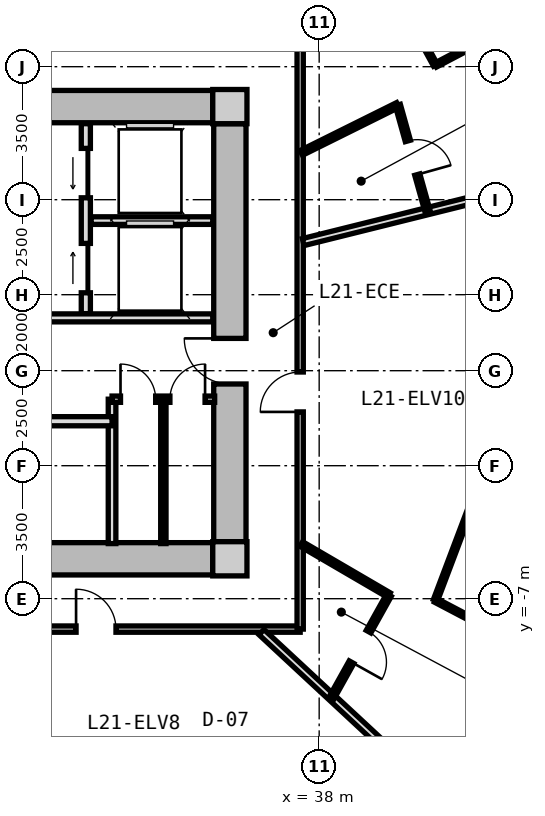
"""IFC4 building model, lengths in metres.
Left out: names, types, materials, properties, quantities, classifications, styles, units other than length and angle.
Written with IfcOpenShell. Run it as: python <this file> out.ifc"""

import sys

from ifc_helpers import new_model, si_unit, direction, frame, frame_2d, origin, origin_2d, place, context, subcontext, project, spatial, rectangle, extrude, source, transform, mapped, element, fill, save


model = new_model("IFC4")
c1 = context("Model", 3, precision=1e-05, world=origin(), true_north=direction((0.0, 1.0)))
c2 = subcontext(c1, "Body", "Model", "MODEL_VIEW")
j1 = project(units=[si_unit("LENGTHUNIT", "METRE"), si_unit("PLANEANGLEUNIT", "RADIAN")], contexts=[c1])
p1 = place(None, origin())
s1 = spatial("IfcSite", under=j1, at=p1, CompositionType="ELEMENT")
p2 = place(p1, origin())
s2 = spatial("IfcBuilding", under=s1, at=p2, CompositionType="ELEMENT")
p3 = place(p2, frame((0.0, 0.0, 70.4)))
s3 = spatial("IfcBuildingStorey", under=s2, at=p3, CompositionType="ELEMENT", Elevation=70.4)
m1 = source(origin(), c2, "Body", "SweptSolid", [
    extrude(rectangle(XDim=0.9, YDim=0.9, at=origin_2d()), origin(), (0.0, 0.0, 1.0), 3.05),
])
for number, where, z_axis, x_axis in (
    (1, (35.65, -5.95, 0.0), (0.0, 0.0, 1.0), (1.0, 0.0, 0.0)),
    (2, (35.65, 5.95, 0.0), (0.0, 0.0, 1.0), (1.0, 0.0, 0.0)),
):
    element("IfcColumn", number, at=place(p3, frame(where, z_axis=z_axis, x_axis=x_axis)), inside=s3, PredefinedType="COLUMN", context=c2, shape_type="MappedRepresentation", body=[
        mapped(m1, transform((0.0, 0.0, 0.0), x_axis=(1.0, 0.0, 0.0), y_axis=(0.0, 1.0, 0.0), z_axis=(0.0, 0.0, 1.0), scale=1.0)),
    ])
m2 = source(origin(), c2, "Body", "SweptSolid", [
    extrude(rectangle(XDim=14.4, YDim=0.85, at=frame_2d((7.2, 0.0))), origin(), (0.0, 0.0, 1.0), 2.73),
])
for number, where, z_axis, x_axis in (
    (3, (20.8, 5.95, 0.0), (0.0, 0.0, 1.0), (1.0, 0.0, 0.0)),
    (4, (35.2, -5.95, 0.0), (0.0, 0.0, 1.0), (-1.0, 0.0, 0.0)),
):
    element("IfcWall", number, at=place(p3, frame(where, z_axis=z_axis, x_axis=x_axis)), inside=s3, PredefinedType="SHEAR", context=c2, shape_type="MappedRepresentation", body=[
        mapped(m2, transform((0.0, 0.0, 0.0), x_axis=(1.0, 0.0, 0.0), y_axis=(0.0, 1.0, 0.0), z_axis=(0.0, 0.0, 1.0), scale=1.0)),
    ])
m3 = source(origin(), c2, "Body", "SweptSolid", [
    extrude(rectangle(XDim=11.0, YDim=0.85, at=frame_2d((5.5, 0.0))), origin(), (0.0, 0.0, 1.0), 2.73),
])
p4 = place(p3, frame((35.65, 5.5, 0.0), z_axis=(0.0, 0.0, 1.0), x_axis=(0.0, -1.0, 0.0)))
e5 = element("IfcWall", 5, at=p4, inside=s3, PredefinedType="SHEAR", context=c2, shape_type="MappedRepresentation", body=[
    mapped(m3, transform((0.0, 0.0, 0.0), x_axis=(1.0, 0.0, 0.0), y_axis=(0.0, 1.0, 0.0), z_axis=(0.0, 0.0, 1.0), scale=1.0)),
])
p5 = place(p4, frame((5.65, 0.0, 0.0)))
e6 = element("IfcOpeningElement", 6, at=p5, cuts=e5, PredefinedType="OPENING", context=c2, shape_type="SweptSolid", body=[
    extrude(rectangle(XDim=1.2, YDim=2.15, at=frame_2d((0.6, 1.075))), frame((0.0, 0.435, 0.0), z_axis=(0.0, -1.0, 0.0), x_axis=(1.0, 0.0, 0.0)), (0.0, 0.0, 1.0), 0.87),
])
m4 = source(origin(), c2, "Body", "SweptSolid", [
    extrude(rectangle(XDim=5.0, YDim=0.24, at=frame_2d((2.5, 0.0))), origin(), (0.0, 0.0, 1.0), 2.715),
])
p6 = place(p3, frame((31.86, 0.5, 0.0), z_axis=(0.0, 0.0, 1.0), x_axis=(0.0, 1.0, 0.0)))
e7 = element("IfcWall", 7, at=p6, inside=s3, PredefinedType="PARTITIONING", context=c2, shape_type="MappedRepresentation", body=[
    mapped(m4, transform((0.0, 0.0, 0.0), x_axis=(1.0, 0.0, 0.0), y_axis=(0.0, 1.0, 0.0), z_axis=(0.0, 0.0, 1.0), scale=1.0)),
])
p7 = place(p6, frame((3.05, 0.0, 0.0)))
e8 = element("IfcOpeningElement", 8, at=p7, cuts=e7, PredefinedType="OPENING", context=c2, shape_type="SweptSolid", body=[
    extrude(rectangle(XDim=1.3, YDim=2.2, at=frame_2d((0.65, 1.1))), frame((0.0, 0.13, 0.0), z_axis=(0.0, -1.0, 0.0), x_axis=(1.0, 0.0, 0.0)), (0.0, 0.0, 1.0), 0.26),
])
p8 = place(p6, frame((0.55, 0.0, 0.0)))
e9 = element("IfcOpeningElement", 9, at=p8, cuts=e7, PredefinedType="OPENING", context=c2, shape_type="SweptSolid", body=[
    extrude(rectangle(XDim=1.3, YDim=2.2, at=frame_2d((0.65, 1.1))), frame((0.0, 0.13, 0.0), z_axis=(0.0, -1.0, 0.0), x_axis=(1.0, 0.0, 0.0)), (0.0, 0.0, 1.0), 0.26),
])
m5 = source(origin(), c2, "Body", "SweptSolid", [
    extrude(rectangle(XDim=3.2, YDim=0.2, at=frame_2d((1.6, 0.0))), origin(), (0.0, 0.0, 1.0), 2.715),
])
p9 = place(p3, frame((32.0, 2.95, 0.0), z_axis=(0.0, 0.0, 1.0), x_axis=(1.0, 0.0, 0.0)))
e10 = element("IfcWall", 10, at=p9, inside=s3, PredefinedType="PARTITIONING", context=c2, shape_type="MappedRepresentation", body=[
    mapped(m5, transform((0.0, 0.0, 0.0), x_axis=(1.0, 0.0, 0.0), y_axis=(0.0, 1.0, 0.0), z_axis=(0.0, 0.0, 1.0), scale=1.0)),
])
m6 = source(origin(), c2, "Body", "SweptSolid", [
    extrude(rectangle(XDim=6.66, YDim=0.21, at=frame_2d((3.33, 0.0))), origin(), (0.0, 0.0, 1.0), 2.715),
])
p10 = place(p3, frame((28.54, 0.39, 0.0), z_axis=(0.0, 0.0, 1.0), x_axis=(1.0, 0.0, 0.0)))
e11 = element("IfcWall", 11, at=p10, inside=s3, PredefinedType="PARTITIONING", context=c2, shape_type="MappedRepresentation", body=[
    mapped(m6, transform((0.0, 0.0, 0.0), x_axis=(1.0, 0.0, 0.0), y_axis=(0.0, 1.0, 0.0), z_axis=(0.0, 0.0, 1.0), scale=1.0)),
])
p11 = place(p10, frame((1.0, 0.0, 0.0)))
e12 = element("IfcOpeningElement", 12, at=p11, cuts=e11, PredefinedType="OPENING", context=c2, shape_type="SweptSolid", body=[
    extrude(rectangle(XDim=1.2, YDim=2.15, at=frame_2d((0.6, 1.075))), frame((0.0, 0.115, 0.0), z_axis=(0.0, -1.0, 0.0), x_axis=(1.0, 0.0, 0.0)), (0.0, 0.0, 1.0), 0.23),
])
m7 = source(origin(), c2, "Body", "SweptSolid", [
    extrude(rectangle(XDim=3.8, YDim=0.2, at=frame_2d((1.9, 0.0))), origin(), (0.0, 0.0, 1.0), 2.715),
])
p12 = place(p3, frame((32.55, -5.55, 0.0), z_axis=(0.0, 0.0, 1.0), x_axis=(0.0, 1.0, 0.0)))
e13 = element("IfcWall", 13, at=p12, inside=s3, PredefinedType="PARTITIONING", context=c2, shape_type="MappedRepresentation", body=[
    mapped(m7, transform((0.0, 0.0, 0.0), x_axis=(1.0, 0.0, 0.0), y_axis=(0.0, 1.0, 0.0), z_axis=(0.0, 0.0, 1.0), scale=1.0)),
])
m8 = source(origin(), c2, "Body", "SweptSolid", [
    extrude(rectangle(XDim=4.13, YDim=0.24, at=frame_2d((2.065, 0.0))), origin(), (0.0, 0.0, 1.0), 2.715),
])
p13 = place(p3, frame((28.42, -2.33, 0.0), z_axis=(0.0, 0.0, 1.0), x_axis=(1.0, 0.0, 0.0)))
e14 = element("IfcWall", 14, at=p13, inside=s3, PredefinedType="PARTITIONING", context=c2, shape_type="MappedRepresentation", body=[
    mapped(m8, transform((0.0, 0.0, 0.0), x_axis=(1.0, 0.0, 0.0), y_axis=(0.0, 1.0, 0.0), z_axis=(0.0, 0.0, 1.0), scale=1.0)),
])
m9 = source(origin(), c2, "Body", "SweptSolid", [
    extrude(rectangle(XDim=2.7, YDim=0.165, at=frame_2d((1.35, 0.0))), origin(), (0.0, 0.0, 1.0), 2.715),
])
p14 = place(p3, frame((32.55, -1.75, 0.0), z_axis=(0.0, 0.0, 1.0), x_axis=(1.0, 0.0, 0.0)))
e15 = element("IfcWall", 15, at=p14, inside=s3, PredefinedType="PARTITIONING", context=c2, shape_type="MappedRepresentation", body=[
    mapped(m9, transform((0.0, 0.0, 0.0), x_axis=(1.0, 0.0, 0.0), y_axis=(0.0, 1.0, 0.0), z_axis=(0.0, 0.0, 1.0), scale=1.0)),
])
p15 = place(p14, frame((0.222, 0.0, 0.0)))
e16 = element("IfcOpeningElement", 16, at=p15, cuts=e15, PredefinedType="OPENING", context=c2, shape_type="SweptSolid", body=[
    extrude(rectangle(XDim=0.925, YDim=2.1, at=frame_2d((0.462, 1.05))), frame((0.0, 0.093, 0.0), z_axis=(0.0, -1.0, 0.0), x_axis=(1.0, 0.0, 0.0)), (0.0, 0.0, 1.0), 0.185),
])
p16 = place(p14, frame((1.522, 0.0, 0.0)))
e17 = element("IfcOpeningElement", 17, at=p16, cuts=e15, PredefinedType="OPENING", context=c2, shape_type="SweptSolid", body=[
    extrude(rectangle(XDim=0.925, YDim=2.1, at=frame_2d((0.462, 1.05))), frame((0.0, 0.093, 0.0), z_axis=(0.0, -1.0, 0.0), x_axis=(1.0, 0.0, 0.0)), (0.0, 0.0, 1.0), 0.185),
])
m10 = source(origin(), c2, "Body", "SweptSolid", [
    extrude(rectangle(XDim=3.8, YDim=0.14, at=frame_2d((1.9, 0.0))), origin(), (0.0, 0.0, 1.0), 2.715),
])
p17 = place(p3, frame((33.9, -5.55, 0.0), z_axis=(0.0, 0.0, 1.0), x_axis=(0.0, 1.0, 0.0)))
e18 = element("IfcWall", 18, at=p17, inside=s3, PredefinedType="PARTITIONING", context=c2, shape_type="MappedRepresentation", body=[
    mapped(m10, transform((0.0, 0.0, 0.0), x_axis=(1.0, 0.0, 0.0), y_axis=(0.0, 1.0, 0.0), z_axis=(0.0, 0.0, 1.0), scale=1.0)),
])
m11 = source(origin(), c2, "Body", "SweptSolid", [
    extrude(rectangle(XDim=19.0, YDim=0.165, at=frame_2d((9.5, 0.0))), origin(), (0.0, 0.0, 1.0), 2.715),
])
p18 = place(p3, frame((37.5, -7.8, 0.0), z_axis=(0.0, 0.0, 1.0), x_axis=(-1.0, 0.0, 0.0)))
e19 = element("IfcWall", 19, at=p18, inside=s3, PredefinedType="PARTITIONING", context=c2, shape_type="MappedRepresentation", body=[
    mapped(m11, transform((0.0, 0.0, 0.0), x_axis=(1.0, 0.0, 0.0), y_axis=(0.0, 1.0, 0.0), z_axis=(0.0, 0.0, 1.0), scale=1.0)),
])
p19 = place(p18, frame((14.72, 0.0, 0.0)))
e20 = element("IfcOpeningElement", 20, at=p19, cuts=e19, PredefinedType="OPENING", context=c2, shape_type="SweptSolid", body=[
    extrude(rectangle(XDim=1.05, YDim=2.15, at=frame_2d((0.525, 1.075))), frame((0.0, 0.093, 0.0), z_axis=(0.0, -1.0, 0.0), x_axis=(1.0, 0.0, 0.0)), (0.0, 0.0, 1.0), 0.185),
])
p20 = place(p18, frame((4.847, 0.0, 0.0)))
e21 = element("IfcOpeningElement", 21, at=p20, cuts=e19, PredefinedType="OPENING", context=c2, shape_type="SweptSolid", body=[
    extrude(rectangle(XDim=1.05, YDim=2.15, at=frame_2d((0.525, 1.075))), frame((0.0, 0.093, 0.0), z_axis=(0.0, -1.0, 0.0), x_axis=(1.0, 0.0, 0.0)), (0.0, 0.0, 1.0), 0.185),
])
m12 = source(origin(), c2, "Body", "SweptSolid", [
    extrude(rectangle(XDim=15.6, YDim=0.165, at=frame_2d((7.8, 0.0))), origin(), (0.0, 0.0, 1.0), 2.715),
])
p21 = place(p3, frame((37.5, 7.8, 0.0), z_axis=(0.0, 0.0, 1.0), x_axis=(0.0, -1.0, 0.0)))
e22 = element("IfcWall", 22, at=p21, inside=s3, PredefinedType="PARTITIONING", context=c2, shape_type="MappedRepresentation", body=[
    mapped(m12, transform((0.0, 0.0, 0.0), x_axis=(1.0, 0.0, 0.0), y_axis=(0.0, 1.0, 0.0), z_axis=(0.0, 0.0, 1.0), scale=1.0)),
])
p22 = place(p21, frame((8.835, 0.0, 0.0)))
e23 = element("IfcOpeningElement", 23, at=p22, cuts=e22, PredefinedType="OPENING", context=c2, shape_type="SweptSolid", body=[
    extrude(rectangle(XDim=1.05, YDim=2.15, at=frame_2d((0.525, 1.075))), frame((0.0, 0.093, 0.0), z_axis=(0.0, -1.0, 0.0), x_axis=(1.0, 0.0, 0.0)), (0.0, 0.0, 1.0), 0.185),
])
m13 = source(origin(), c2, "Body", "SweptSolid", [
    extrude(rectangle(XDim=7.435, YDim=0.19, at=frame_2d((3.717, 0.0))), origin(), (0.0, 0.0, 1.0), 2.165),
])
p23 = place(p3, frame((36.483, -7.88, 0.0), z_axis=(0.0, 0.0, 1.0), x_axis=(0.732651956848, -0.680603489652, 0.0)))
e24 = element("IfcWall", 24, at=p23, inside=s3, PredefinedType="PARTITIONING", context=c2, shape_type="MappedRepresentation", body=[
    mapped(m13, transform((0.0, 0.0, 0.0), x_axis=(1.0, 0.0, 0.0), y_axis=(0.0, 1.0, 0.0), z_axis=(0.0, 0.0, 1.0), scale=1.0)),
])
m14 = source(origin(), c2, "Body", "SweptSolid", [
    extrude(rectangle(XDim=9.737, YDim=0.19, at=frame_2d((4.869, 0.0))), origin(), (0.0, 0.0, 1.0), 2.165),
])
p24 = place(p3, frame((37.58, 2.385, 0.0), z_axis=(0.0, 0.0, 1.0), x_axis=(0.970392716238, 0.241532557375, 0.0)))
e25 = element("IfcWall", 25, at=p24, inside=s3, PredefinedType="PARTITIONING", context=c2, shape_type="MappedRepresentation", body=[
    mapped(m14, transform((0.0, 0.0, 0.0), x_axis=(1.0, 0.0, 0.0), y_axis=(0.0, 1.0, 0.0), z_axis=(0.0, 0.0, 1.0), scale=1.0)),
])
m15 = source(origin(), c2, "Body", "SweptSolid", [
    extrude(rectangle(XDim=2.669, YDim=0.14, at=frame_2d((1.335, 0.0))), origin(), (0.0, 0.0, 1.0), 2.715),
])
p25 = place(p3, frame((37.53, -5.561, 0.0), z_axis=(0.0, 0.0, 1.0), x_axis=(0.86369928178, -0.50400749067, 0.0)))
e26 = element("IfcWall", 26, at=p25, inside=s3, PredefinedType="PARTITIONING", context=c2, shape_type="MappedRepresentation", body=[
    mapped(m15, transform((0.0, 0.0, 0.0), x_axis=(1.0, 0.0, 0.0), y_axis=(0.0, 1.0, 0.0), z_axis=(0.0, 0.0, 1.0), scale=1.0)),
])
m16 = source(origin(), c2, "Body", "SweptSolid", [
    extrude(rectangle(XDim=3.121, YDim=0.14, at=frame_2d((1.561, 0.0))), origin(), (0.0, 0.0, 1.0), 2.715),
])
p26 = place(p3, frame((39.836, -6.906, 0.0), z_axis=(0.0, 0.0, 1.0), x_axis=(-0.487302357327, -0.873233309342, 0.0)))
e27 = element("IfcWall", 27, at=p26, inside=s3, PredefinedType="PARTITIONING", context=c2, shape_type="MappedRepresentation", body=[
    mapped(m16, transform((0.0, 0.0, 0.0), x_axis=(1.0, 0.0, 0.0), y_axis=(0.0, 1.0, 0.0), z_axis=(0.0, 0.0, 1.0), scale=1.0)),
])
p27 = place(p26, frame((1.101, 0.0, 0.0)))
e28 = element("IfcOpeningElement", 28, at=p27, cuts=e27, PredefinedType="OPENING", context=c2, shape_type="SweptSolid", body=[
    extrude(rectangle(XDim=0.92, YDim=2.1, at=frame_2d((0.46, 1.05))), frame((0.0, 0.08, 0.0), z_axis=(0.0, -1.0, 0.0), x_axis=(1.0, 0.0, 0.0)), (0.0, 0.0, 1.0), 0.16),
])
m17 = source(origin(), c2, "Body", "SweptSolid", [
    extrude(rectangle(XDim=3.864, YDim=0.115, at=frame_2d((1.932, 0.0))), origin(), (0.0, 0.0, 1.0), 2.715),
])
p28 = place(p3, frame((41.06, -7.041, 0.0), z_axis=(0.0, 0.0, 1.0), x_axis=(0.885194959803, -0.465220252289, 0.0)))
e29 = element("IfcWall", 29, at=p28, inside=s3, PredefinedType="PARTITIONING", context=c2, shape_type="MappedRepresentation", body=[
    mapped(m17, transform((0.0, 0.0, 0.0), x_axis=(1.0, 0.0, 0.0), y_axis=(0.0, 1.0, 0.0), z_axis=(0.0, 0.0, 1.0), scale=1.0)),
])
p29 = place(p28, frame((1.457, 0.0, 0.0)))
e30 = element("IfcOpeningElement", 30, at=p29, cuts=e29, PredefinedType="OPENING", context=c2, shape_type="SweptSolid", body=[
    extrude(rectangle(XDim=0.95, YDim=2.1, at=frame_2d((0.475, 1.05))), frame((0.0, 0.067, 0.0), z_axis=(0.0, -1.0, 0.0), x_axis=(1.0, 0.0, 0.0)), (0.0, 0.0, 1.0), 0.135),
])
m18 = source(origin(), c2, "Body", "SweptSolid", [
    extrude(rectangle(XDim=3.685, YDim=0.115, at=frame_2d((1.843, 0.0))), origin(), (0.0, 0.0, 1.0), 2.715),
])
p30 = place(p3, frame((41.06, -7.041, 0.0), z_axis=(0.0, 0.0, 1.0), x_axis=(0.353503632997, 0.935433151785, 0.0)))
e31 = element("IfcWall", 31, at=p30, inside=s3, PredefinedType="PARTITIONING", context=c2, shape_type="MappedRepresentation", body=[
    mapped(m18, transform((0.0, 0.0, 0.0), x_axis=(1.0, 0.0, 0.0), y_axis=(0.0, 1.0, 0.0), z_axis=(0.0, 0.0, 1.0), scale=1.0)),
])
m19 = source(origin(), c2, "Body", "SweptSolid", [
    extrude(rectangle(XDim=2.834, YDim=0.14, at=frame_2d((1.417, 0.0))), origin(), (0.0, 0.0, 1.0), 2.715),
])
p31 = place(p3, frame((37.53, 4.732, 0.0), z_axis=(0.0, 0.0, 1.0), x_axis=(0.895681174462, 0.444696788513, 0.0)))
e32 = element("IfcWall", 32, at=p31, inside=s3, PredefinedType="PARTITIONING", context=c2, shape_type="MappedRepresentation", body=[
    mapped(m19, transform((0.0, 0.0, 0.0), x_axis=(1.0, 0.0, 0.0), y_axis=(0.0, 1.0, 0.0), z_axis=(0.0, 0.0, 1.0), scale=1.0)),
])
m20 = source(origin(), c2, "Body", "SweptSolid", [
    extrude(rectangle(XDim=2.885, YDim=0.14, at=frame_2d((1.442, 0.0))), origin(), (0.0, 0.0, 1.0), 2.715),
])
p32 = place(p3, frame((40.069, 5.992, 0.0), z_axis=(0.0, 0.0, 1.0), x_axis=(0.269799431837, -0.962916541856, 0.0)))
e33 = element("IfcWall", 33, at=p32, inside=s3, PredefinedType="PARTITIONING", context=c2, shape_type="MappedRepresentation", body=[
    mapped(m20, transform((0.0, 0.0, 0.0), x_axis=(1.0, 0.0, 0.0), y_axis=(0.0, 1.0, 0.0), z_axis=(0.0, 0.0, 1.0), scale=1.0)),
])
p33 = place(p32, frame((0.982, 0.0, 0.0)))
e34 = element("IfcOpeningElement", 34, at=p33, cuts=e33, PredefinedType="OPENING", context=c2, shape_type="SweptSolid", body=[
    extrude(rectangle(XDim=0.92, YDim=2.1, at=frame_2d((0.46, 1.05))), frame((0.0, 0.08, 0.0), z_axis=(0.0, -1.0, 0.0), x_axis=(1.0, 0.0, 0.0)), (0.0, 0.0, 1.0), 0.16),
])
p34 = place(p3, frame((41.06, 7.041, 0.0), z_axis=(0.0, 0.0, 1.0), x_axis=(0.885194959803, 0.465220252289, 0.0)))
e35 = element("IfcWall", 35, at=p34, inside=s3, PredefinedType="PARTITIONING", context=c2, shape_type="MappedRepresentation", body=[
    mapped(m17, transform((0.0, 0.0, 0.0), x_axis=(1.0, 0.0, 0.0), y_axis=(0.0, 1.0, 0.0), z_axis=(0.0, 0.0, 1.0), scale=1.0)),
])
m21 = source(origin(), c2, "Body", "SweptSolid", [
    extrude(rectangle(XDim=3.888, YDim=0.115, at=frame_2d((1.944, 0.0))), origin(), (0.0, 0.0, 1.0), 2.715),
])
p35 = place(p3, frame((41.06, 7.041, 0.0), z_axis=(0.0, 0.0, 1.0), x_axis=(-0.480382482853, 0.877059103007, 0.0)))
e36 = element("IfcWall", 36, at=p35, inside=s3, PredefinedType="PARTITIONING", context=c2, shape_type="MappedRepresentation", body=[
    mapped(m21, transform((0.0, 0.0, 0.0), x_axis=(1.0, 0.0, 0.0), y_axis=(0.0, 1.0, 0.0), z_axis=(0.0, 0.0, 1.0), scale=1.0)),
])
p36 = place(p35, frame((1.469, 0.0, 0.0)))
e37 = element("IfcOpeningElement", 37, at=p36, cuts=e36, PredefinedType="OPENING", context=c2, shape_type="SweptSolid", body=[
    extrude(rectangle(XDim=0.95, YDim=2.1, at=frame_2d((0.475, 1.05))), frame((0.0, 0.067, 0.0), z_axis=(0.0, -1.0, 0.0), x_axis=(1.0, 0.0, 0.0)), (0.0, 0.0, 1.0), 0.135),
])
m22 = source(origin(), c2, "Body", "SweptSolid", [
    extrude(rectangle(XDim=1.3, YDim=2.2, at=frame_2d((0.65, 1.1))), frame((0.0, 0.025, 0.0), z_axis=(0.0, -1.0, 0.0), x_axis=(1.0, 0.0, 0.0)), (0.0, 0.0, 1.0), 0.05),
])
p37 = place(p7, origin())
e38 = element("IfcDoor", 38, at=p37, inside=s3, OperationType="SLIDING_TO_LEFT", PredefinedType="DOOR", context=c2, shape_type="MappedRepresentation", body=[
    mapped(m22, transform((0.0, 0.0, 0.0), x_axis=(1.0, 0.0, 0.0), y_axis=(0.0, 1.0, 0.0), z_axis=(0.0, 0.0, 1.0), scale=1.0)),
])
fill(e8, e38)
p38 = place(p8, origin())
e39 = element("IfcDoor", 39, at=p38, inside=s3, OperationType="SLIDING_TO_RIGHT", PredefinedType="DOOR", context=c2, shape_type="MappedRepresentation", body=[
    mapped(m22, transform((0.0, 0.0, 0.0), x_axis=(1.0, 0.0, 0.0), y_axis=(0.0, 1.0, 0.0), z_axis=(0.0, 0.0, 1.0), scale=1.0)),
])
fill(e9, e39)
m23 = source(origin(), c2, "Body", "SweptSolid", [
    extrude(rectangle(XDim=1.2, YDim=2.15, at=frame_2d((0.6, 1.075))), frame((0.0, 0.025, 0.0), z_axis=(0.0, -1.0, 0.0), x_axis=(1.0, 0.0, 0.0)), (0.0, 0.0, 1.0), 0.05),
])
p39 = place(p5, frame((1.2, 0.0, 0.0), z_axis=(0.0, 0.0, 1.0), x_axis=(-1.0, 0.0, 0.0)))
e40 = element("IfcDoor", 40, at=p39, inside=s3, OperationType="SINGLE_SWING_RIGHT", PredefinedType="DOOR", context=c2, shape_type="MappedRepresentation", body=[
    mapped(m23, transform((0.0, 0.0, 0.0), x_axis=(1.0, 0.0, 0.0), y_axis=(0.0, 1.0, 0.0), z_axis=(0.0, 0.0, 1.0), scale=1.0)),
])
fill(e6, e40)
m24 = source(origin(), c2, "Body", "SweptSolid", [
    extrude(rectangle(XDim=0.925, YDim=2.1, at=frame_2d((0.462, 1.05))), frame((0.0, 0.025, 0.0), z_axis=(0.0, -1.0, 0.0), x_axis=(1.0, 0.0, 0.0)), (0.0, 0.0, 1.0), 0.05),
])
p40 = place(p15, origin())
e41 = element("IfcDoor", 41, at=p40, inside=s3, OperationType="SINGLE_SWING_LEFT", PredefinedType="DOOR", context=c2, shape_type="MappedRepresentation", body=[
    mapped(m24, transform((0.0, 0.0, 0.0), x_axis=(1.0, 0.0, 0.0), y_axis=(0.0, 1.0, 0.0), z_axis=(0.0, 0.0, 1.0), scale=1.0)),
])
fill(e16, e41)
p41 = place(p16, origin())
e42 = element("IfcDoor", 42, at=p41, inside=s3, OperationType="SINGLE_SWING_RIGHT", PredefinedType="DOOR", context=c2, shape_type="MappedRepresentation", body=[
    mapped(m24, transform((0.0, 0.0, 0.0), x_axis=(1.0, 0.0, 0.0), y_axis=(0.0, 1.0, 0.0), z_axis=(0.0, 0.0, 1.0), scale=1.0)),
])
fill(e17, e42)
m25 = source(origin(), c2, "Body", "SweptSolid", [
    extrude(rectangle(XDim=1.05, YDim=2.15, at=frame_2d((0.525, 1.075))), frame((0.0, 0.025, 0.0), z_axis=(0.0, -1.0, 0.0), x_axis=(1.0, 0.0, 0.0)), (0.0, 0.0, 1.0), 0.05),
])
p42 = place(p20, frame((1.05, 0.0, 0.0), z_axis=(0.0, 0.0, 1.0), x_axis=(-1.0, 0.0, 0.0)))
e43 = element("IfcDoor", 43, at=p42, inside=s3, OperationType="SINGLE_SWING_LEFT", PredefinedType="DOOR", context=c2, shape_type="MappedRepresentation", body=[
    mapped(m25, transform((0.0, 0.0, 0.0), x_axis=(1.0, 0.0, 0.0), y_axis=(0.0, 1.0, 0.0), z_axis=(0.0, 0.0, 1.0), scale=1.0)),
])
fill(e21, e43)
p43 = place(p22, frame((1.05, 0.0, 0.0), z_axis=(0.0, 0.0, 1.0), x_axis=(-1.0, 0.0, 0.0)))
e44 = element("IfcDoor", 44, at=p43, inside=s3, OperationType="SINGLE_SWING_LEFT", PredefinedType="DOOR", context=c2, shape_type="MappedRepresentation", body=[
    mapped(m25, transform((0.0, 0.0, 0.0), x_axis=(1.0, 0.0, 0.0), y_axis=(0.0, 1.0, 0.0), z_axis=(0.0, 0.0, 1.0), scale=1.0)),
])
fill(e23, e44)
m26 = source(origin(), c2, "Body", "SweptSolid", [
    extrude(rectangle(XDim=0.92, YDim=2.1, at=frame_2d((0.46, 1.05))), frame((0.0, 0.025, 0.0), z_axis=(0.0, -1.0, 0.0), x_axis=(1.0, 0.0, 0.0)), (0.0, 0.0, 1.0), 0.05),
])
p44 = place(p27, origin())
e45 = element("IfcDoor", 45, at=p44, inside=s3, OperationType="SINGLE_SWING_RIGHT", PredefinedType="DOOR", context=c2, shape_type="MappedRepresentation", body=[
    mapped(m26, transform((0.0, 0.0, 0.0), x_axis=(1.0, 0.0, 0.0), y_axis=(0.0, 1.0, 0.0), z_axis=(0.0, 0.0, 1.0), scale=1.0)),
])
fill(e28, e45)
p45 = place(p33, origin())
e46 = element("IfcDoor", 46, at=p45, inside=s3, OperationType="SINGLE_SWING_RIGHT", PredefinedType="DOOR", context=c2, shape_type="MappedRepresentation", body=[
    mapped(m26, transform((0.0, 0.0, 0.0), x_axis=(1.0, 0.0, 0.0), y_axis=(0.0, 1.0, 0.0), z_axis=(0.0, 0.0, 1.0), scale=1.0)),
])
fill(e34, e46)
save(model, sys.argv[1])
